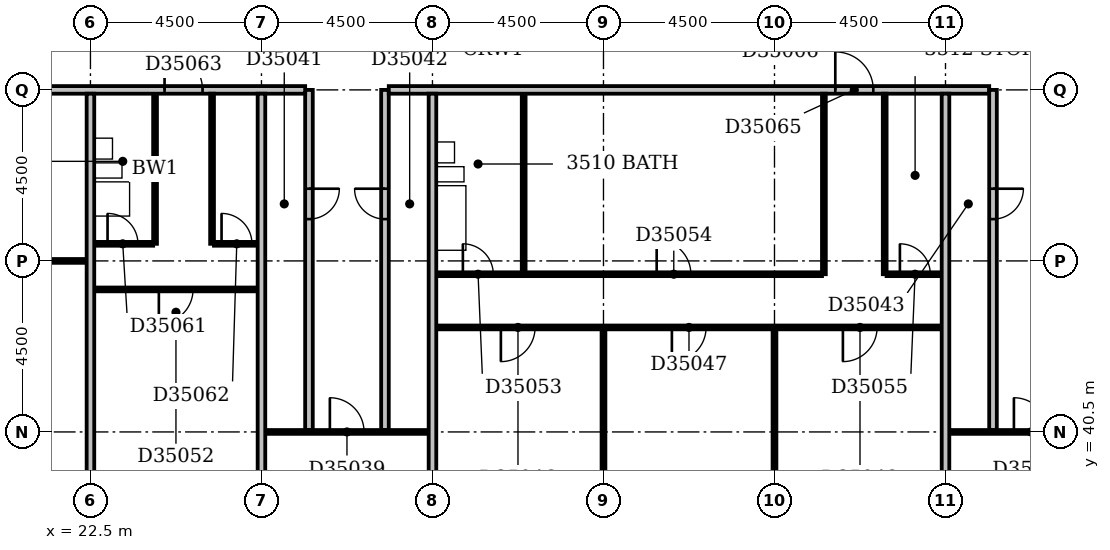
"""IFC4 building model, lengths in metres.
Left out: names, types, materials, properties, quantities, classifications, styles, units other than length and angle.
Written with IfcOpenShell. Run it as: python <this file> out.ifc"""

import sys

from ifc_helpers import new_model, si_unit, direction, frame, frame_2d, origin, place, context, subcontext, project, spatial, rectangle, extrude, element, fill, save


model = new_model("IFC4")
c1 = context("Model", 3, precision=1e-05, world=origin(), true_north=direction((0.0, 1.0)))
c2 = subcontext(c1, "Body", "Model", "MODEL_VIEW")
j1 = project(units=[si_unit("LENGTHUNIT", "METRE"), si_unit("PLANEANGLEUNIT", "RADIAN")], contexts=[c1])
p1 = place(None, origin())
s1 = spatial("IfcSite", under=j1, at=p1, CompositionType="ELEMENT")
p2 = place(p1, origin())
s2 = spatial("IfcBuilding", under=s1, at=p2, CompositionType="ELEMENT")
p3 = place(p2, frame((0.0, 0.0, 141.2)))
s3 = spatial("IfcBuildingStorey", under=s2, at=p3, CompositionType="ELEMENT", Elevation=141.2)
p4 = place(p3, frame((22.5, 36.5, 0.0), z_axis=(0.0, 0.0, 1.0), x_axis=(0.0, 1.0, 0.0)))
e1 = element("IfcWall", 1, at=p4, inside=s3, PredefinedType="PARTITIONING", context=c2, shape_type="SweptSolid", body=[
    extrude(rectangle(XDim=12.9, YDim=0.2, at=frame_2d((6.45, 0.0))), origin(), (0.0, 0.0, 1.0), 3.3),
])
p5 = place(p3, frame((27.0, 36.5, 0.0), z_axis=(0.0, 0.0, 1.0), x_axis=(0.0, 1.0, 0.0)))
e2 = element("IfcWall", 2, at=p5, inside=s3, PredefinedType="PARTITIONING", context=c2, shape_type="SweptSolid", body=[
    extrude(rectangle(XDim=12.9, YDim=0.2, at=frame_2d((6.45, 0.0))), origin(), (0.0, 0.0, 1.0), 2.6),
])
p6 = place(p3, frame((31.5, 36.5, 0.0), z_axis=(0.0, 0.0, 1.0), x_axis=(0.0, 1.0, 0.0)))
e3 = element("IfcWall", 3, at=p6, inside=s3, PredefinedType="PARTITIONING", context=c2, shape_type="SweptSolid", body=[
    extrude(rectangle(XDim=12.9, YDim=0.2, at=frame_2d((6.45, 0.0))), origin(), (0.0, 0.0, 1.0), 3.3),
])
p7 = place(p3, frame((36.0, 36.5, 0.0), z_axis=(0.0, 0.0, 1.0), x_axis=(0.0, 1.0, 0.0)))
e4 = element("IfcWall", 4, at=p7, inside=s3, PredefinedType="PARTITIONING", context=c2, shape_type="SweptSolid", body=[
    extrude(rectangle(XDim=6.7, YDim=0.1, at=frame_2d((3.35, 0.0))), origin(), (0.0, 0.0, 1.0), 2.4),
])
p8 = place(p3, frame((40.5, 36.5, 0.0), z_axis=(0.0, 0.0, 1.0), x_axis=(0.0, 1.0, 0.0)))
e5 = element("IfcWall", 5, at=p8, inside=s3, PredefinedType="PARTITIONING", context=c2, shape_type="SweptSolid", body=[
    extrude(rectangle(XDim=6.7, YDim=0.1, at=frame_2d((3.35, 0.0))), origin(), (0.0, 0.0, 1.0), 3.3),
])
p9 = place(p3, frame((45.0, 36.5, 0.0), z_axis=(0.0, 0.0, 1.0), x_axis=(0.0, 1.0, 0.0)))
e6 = element("IfcWall", 6, at=p9, inside=s3, PredefinedType="PARTITIONING", context=c2, shape_type="SweptSolid", body=[
    extrude(rectangle(XDim=12.9, YDim=0.2, at=frame_2d((6.45, 0.0))), origin(), (0.0, 0.0, 1.0), 2.6),
])
p10 = place(p3, frame((27.1, 40.5, 0.0), z_axis=(0.0, 0.0, 1.0), x_axis=(1.0, 0.0, 0.0)))
e7 = element("IfcWall", 7, at=p10, inside=s3, PredefinedType="PARTITIONING", context=c2, shape_type="SweptSolid", body=[
    extrude(rectangle(XDim=4.3, YDim=0.1, at=frame_2d((2.15, 0.0))), origin(), (0.0, 0.0, 1.0), 3.3),
])
p11 = place(p10, frame((1.7, 0.0, 0.0)))
e8 = element("IfcOpeningElement", 8, at=p11, cuts=e7, PredefinedType="OPENING", context=c2, shape_type="SweptSolid", body=[
    extrude(rectangle(XDim=0.9, YDim=2.1, at=frame_2d((0.45, 1.05))), frame((0.0, 0.062, 0.0), z_axis=(0.0, -1.0, 0.0), x_axis=(1.0, 0.0, 0.0)), (0.0, 0.0, 1.0), 0.124),
])
p12 = place(p3, frame((45.1, 40.5, 0.0), z_axis=(0.0, 0.0, 1.0), x_axis=(1.0, 0.0, 0.0)))
e9 = element("IfcWall", 9, at=p12, inside=s3, PredefinedType="PARTITIONING", context=c2, shape_type="SweptSolid", body=[
    extrude(rectangle(XDim=4.3, YDim=0.1, at=frame_2d((2.15, 0.0))), origin(), (0.0, 0.0, 1.0), 3.3),
])
p13 = place(p12, frame((1.7, 0.0, 0.0)))
e10 = element("IfcOpeningElement", 10, at=p13, cuts=e9, PredefinedType="OPENING", context=c2, shape_type="SweptSolid", body=[
    extrude(rectangle(XDim=0.9, YDim=2.1, at=frame_2d((0.45, 1.05))), frame((0.0, 0.062, 0.0), z_axis=(0.0, -1.0, 0.0), x_axis=(1.0, 0.0, 0.0)), (0.0, 0.0, 1.0), 0.124),
])
p14 = place(p3, frame((28.25, 40.55, 0.0), z_axis=(0.0, 0.0, 1.0), x_axis=(0.0, 1.0, 0.0)))
e11 = element("IfcWall", 11, at=p14, inside=s3, PredefinedType="PARTITIONING", context=c2, shape_type="SweptSolid", body=[
    extrude(rectangle(XDim=8.95, YDim=0.2, at=frame_2d((4.475, 0.0))), origin(), (0.0, 0.0, 1.0), 3.3),
])
p15 = place(p14, frame((5.55, 0.0, 0.0)))
e12 = element("IfcOpeningElement", 12, at=p15, cuts=e11, PredefinedType="OPENING", context=c2, shape_type="SweptSolid", body=[
    extrude(rectangle(XDim=0.8, YDim=2.1, at=frame_2d((0.4, 1.05))), frame((0.0, 0.112, 0.0), z_axis=(0.0, -1.0, 0.0), x_axis=(1.0, 0.0, 0.0)), (0.0, 0.0, 1.0), 0.224),
])
p16 = place(p3, frame((30.25, 40.55, 0.0), z_axis=(0.0, 0.0, 1.0), x_axis=(0.0, 1.0, 0.0)))
e13 = element("IfcWall", 13, at=p16, inside=s3, PredefinedType="PARTITIONING", context=c2, shape_type="SweptSolid", body=[
    extrude(rectangle(XDim=8.95, YDim=0.2, at=frame_2d((4.475, 0.0))), origin(), (0.0, 0.0, 1.0), 3.3),
])
p17 = place(p16, frame((5.55, 0.0, 0.0)))
e14 = element("IfcOpeningElement", 14, at=p17, cuts=e13, PredefinedType="OPENING", context=c2, shape_type="SweptSolid", body=[
    extrude(rectangle(XDim=0.8, YDim=2.1, at=frame_2d((0.4, 1.05))), frame((0.0, 0.112, 0.0), z_axis=(0.0, -1.0, 0.0), x_axis=(1.0, 0.0, 0.0)), (0.0, 0.0, 1.0), 0.224),
])
p18 = place(p3, frame((46.25, 40.55, 0.0), z_axis=(0.0, 0.0, 1.0), x_axis=(0.0, 1.0, 0.0)))
e15 = element("IfcWall", 15, at=p18, inside=s3, PredefinedType="PARTITIONING", context=c2, shape_type="SweptSolid", body=[
    extrude(rectangle(XDim=8.95, YDim=0.2, at=frame_2d((4.475, 0.0))), origin(), (0.0, 0.0, 1.0), 3.3),
])
p19 = place(p18, frame((5.55, 0.0, 0.0)))
e16 = element("IfcOpeningElement", 16, at=p19, cuts=e15, PredefinedType="OPENING", context=c2, shape_type="SweptSolid", body=[
    extrude(rectangle(XDim=0.8, YDim=2.1, at=frame_2d((0.4, 1.05))), frame((0.0, 0.112, 0.0), z_axis=(0.0, -1.0, 0.0), x_axis=(1.0, 0.0, 0.0)), (0.0, 0.0, 1.0), 0.224),
])
p20 = place(p3, frame((31.6, 43.25, 0.0), z_axis=(0.0, 0.0, 1.0), x_axis=(1.0, 0.0, 0.0)))
e17 = element("IfcWall", 17, at=p20, inside=s3, PredefinedType="PARTITIONING", context=c2, shape_type="SweptSolid", body=[
    extrude(rectangle(XDim=13.3, YDim=0.1, at=frame_2d((6.65, 0.0))), origin(), (0.0, 0.0, 1.0), 3.3),
])
p21 = place(p20, frame((1.7, 0.0, 0.0)))
e18 = element("IfcOpeningElement", 18, at=p21, cuts=e17, PredefinedType="OPENING", context=c2, shape_type="SweptSolid", body=[
    extrude(rectangle(XDim=0.9, YDim=2.1, at=frame_2d((0.45, 1.05))), frame((0.0, 0.062, 0.0), z_axis=(0.0, -1.0, 0.0), x_axis=(1.0, 0.0, 0.0)), (0.0, 0.0, 1.0), 0.124),
])
p22 = place(p20, frame((6.2, 0.0, 0.0)))
e19 = element("IfcOpeningElement", 19, at=p22, cuts=e17, PredefinedType="OPENING", context=c2, shape_type="SweptSolid", body=[
    extrude(rectangle(XDim=0.9, YDim=2.1, at=frame_2d((0.45, 1.05))), frame((0.0, 0.062, 0.0), z_axis=(0.0, -1.0, 0.0), x_axis=(1.0, 0.0, 0.0)), (0.0, 0.0, 1.0), 0.124),
])
p23 = place(p20, frame((10.7, 0.0, 0.0)))
e20 = element("IfcOpeningElement", 20, at=p23, cuts=e17, PredefinedType="OPENING", context=c2, shape_type="SweptSolid", body=[
    extrude(rectangle(XDim=0.9, YDim=2.1, at=frame_2d((0.45, 1.05))), frame((0.0, 0.062, 0.0), z_axis=(0.0, -1.0, 0.0), x_axis=(1.0, 0.0, 0.0)), (0.0, 0.0, 1.0), 0.124),
])
p24 = place(p3, frame((22.6, 44.25, 0.0), z_axis=(0.0, 0.0, 1.0), x_axis=(1.0, 0.0, 0.0)))
e21 = element("IfcWall", 21, at=p24, inside=s3, PredefinedType="PARTITIONING", context=c2, shape_type="SweptSolid", body=[
    extrude(rectangle(XDim=4.3, YDim=0.1, at=frame_2d((2.15, 0.0))), origin(), (0.0, 0.0, 1.0), 3.3),
])
p25 = place(p24, frame((1.7, 0.0, 0.0)))
e22 = element("IfcOpeningElement", 22, at=p25, cuts=e21, PredefinedType="OPENING", context=c2, shape_type="SweptSolid", body=[
    extrude(rectangle(XDim=0.9, YDim=2.1, at=frame_2d((0.45, 1.05))), frame((0.0, 0.062, 0.0), z_axis=(0.0, -1.0, 0.0), x_axis=(1.0, 0.0, 0.0)), (0.0, 0.0, 1.0), 0.124),
])
p26 = place(p3, frame((31.6, 44.65, 0.0), z_axis=(0.0, 0.0, 1.0), x_axis=(1.0, 0.0, 0.0)))
e23 = element("IfcWall", 23, at=p26, inside=s3, PredefinedType="PARTITIONING", context=c2, shape_type="SweptSolid", body=[
    extrude(rectangle(XDim=10.15, YDim=0.1, at=frame_2d((5.075, 0.0))), origin(), (0.0, 0.0, 1.0), 3.3),
])
p27 = place(p26, frame((0.7, 0.0, 0.0)))
e24 = element("IfcOpeningElement", 24, at=p27, cuts=e23, PredefinedType="OPENING", context=c2, shape_type="SweptSolid", body=[
    extrude(rectangle(XDim=0.8, YDim=2.1, at=frame_2d((0.4, 1.05))), frame((0.0, 0.062, 0.0), z_axis=(0.0, -1.0, 0.0), x_axis=(1.0, 0.0, 0.0)), (0.0, 0.0, 1.0), 0.124),
])
p28 = place(p26, frame((5.8, 0.0, 0.0)))
e25 = element("IfcOpeningElement", 25, at=p28, cuts=e23, PredefinedType="OPENING", context=c2, shape_type="SweptSolid", body=[
    extrude(rectangle(XDim=0.9, YDim=2.1, at=frame_2d((0.45, 1.05))), frame((0.0, 0.062, 0.0), z_axis=(0.0, -1.0, 0.0), x_axis=(1.0, 0.0, 0.0)), (0.0, 0.0, 1.0), 0.124),
])
for number, where, z_axis, x_axis in (
    (26, (41.8, 44.65, 0.0), (0.0, 0.0, 1.0), (0.0, 1.0, 0.0)),
    (27, (43.4, 44.65, 0.0), (0.0, 0.0, 1.0), (0.0, 1.0, 0.0)),
):
    element("IfcWall", number, at=place(p3, frame(where, z_axis=z_axis, x_axis=x_axis)), inside=s3, PredefinedType="PARTITIONING", context=c2, shape_type="SweptSolid", body=[
        extrude(rectangle(XDim=4.75, YDim=0.1, at=frame_2d((2.375, 0.0))), origin(), (0.0, 0.0, 1.0), 3.3),
    ])
p29 = place(p3, frame((43.45, 44.65, 0.0), z_axis=(0.0, 0.0, 1.0), x_axis=(1.0, 0.0, 0.0)))
e28 = element("IfcWall", 28, at=p29, inside=s3, PredefinedType="PARTITIONING", context=c2, shape_type="SweptSolid", body=[
    extrude(rectangle(XDim=1.45, YDim=0.1, at=frame_2d((0.725, 0.0))), origin(), (0.0, 0.0, 1.0), 3.3),
])
p30 = place(p29, frame((0.35, 0.0, 0.0)))
e29 = element("IfcOpeningElement", 29, at=p30, cuts=e28, PredefinedType="OPENING", context=c2, shape_type="SweptSolid", body=[
    extrude(rectangle(XDim=0.8, YDim=2.1, at=frame_2d((0.4, 1.05))), frame((0.0, 0.062, 0.0), z_axis=(0.0, -1.0, 0.0), x_axis=(1.0, 0.0, 0.0)), (0.0, 0.0, 1.0), 0.124),
])
p31 = place(p3, frame((33.9, 44.7, 0.0), z_axis=(0.0, 0.0, 1.0), x_axis=(0.0, 1.0, 0.0)))
e30 = element("IfcWall", 30, at=p31, inside=s3, PredefinedType="PLUMBINGWALL", context=c2, shape_type="SweptSolid", body=[
    extrude(rectangle(XDim=4.7, YDim=0.1, at=frame_2d((2.35, 0.0))), origin(), (0.0, 0.0, 1.0), 3.3),
])
p32 = place(p3, frame((9.1, 45.0, 0.0), z_axis=(0.0, 0.0, 1.0), x_axis=(1.0, 0.0, 0.0)))
e31 = element("IfcWall", 31, at=p32, inside=s3, PredefinedType="PARTITIONING", context=c2, shape_type="SweptSolid", body=[
    extrude(rectangle(XDim=13.3, YDim=0.1, at=frame_2d((6.65, 0.0))), origin(), (0.0, 0.0, 1.0), 3.3),
])
p33 = place(p3, frame((22.6, 45.45, 0.0), z_axis=(0.0, 0.0, 1.0), x_axis=(1.0, 0.0, 0.0)))
e32 = element("IfcWall", 32, at=p33, inside=s3, PredefinedType="PARTITIONING", context=c2, shape_type="SweptSolid", body=[
    extrude(rectangle(XDim=1.55, YDim=0.1, at=frame_2d((0.775, 0.0))), origin(), (0.0, 0.0, 1.0), 3.3),
])
p34 = place(p33, frame((0.35, 0.0, 0.0)))
e33 = element("IfcOpeningElement", 33, at=p34, cuts=e32, PredefinedType="OPENING", context=c2, shape_type="SweptSolid", body=[
    extrude(rectangle(XDim=0.8, YDim=2.1, at=frame_2d((0.4, 1.05))), frame((0.0, 0.062, 0.0), z_axis=(0.0, -1.0, 0.0), x_axis=(1.0, 0.0, 0.0)), (0.0, 0.0, 1.0), 0.124),
])
p35 = place(p3, frame((24.2, 45.45, 0.0), z_axis=(0.0, 0.0, 1.0), x_axis=(0.0, 1.0, 0.0)))
e34 = element("IfcWall", 34, at=p35, inside=s3, PredefinedType="PLUMBINGWALL", context=c2, shape_type="SweptSolid", body=[
    extrude(rectangle(XDim=3.95, YDim=0.1, at=frame_2d((1.975, 0.0))), origin(), (0.0, 0.0, 1.0), 3.3),
])
p36 = place(p3, frame((25.7, 45.45, 0.0), z_axis=(0.0, 0.0, 1.0), x_axis=(0.0, 1.0, 0.0)))
e35 = element("IfcWall", 35, at=p36, inside=s3, PredefinedType="PARTITIONING", context=c2, shape_type="SweptSolid", body=[
    extrude(rectangle(XDim=3.95, YDim=0.1, at=frame_2d((1.975, 0.0))), origin(), (0.0, 0.0, 1.0), 3.3),
])
p37 = place(p3, frame((25.75, 45.45, 0.0), z_axis=(0.0, 0.0, 1.0), x_axis=(1.0, 0.0, 0.0)))
e36 = element("IfcWall", 36, at=p37, inside=s3, PredefinedType="PARTITIONING", context=c2, shape_type="SweptSolid", body=[
    extrude(rectangle(XDim=1.15, YDim=0.1, at=frame_2d((0.575, 0.0))), origin(), (0.0, 0.0, 1.0), 3.3),
])
p38 = place(p37, frame((0.2, 0.0, 0.0)))
e37 = element("IfcOpeningElement", 37, at=p38, cuts=e36, PredefinedType="OPENING", context=c2, shape_type="SweptSolid", body=[
    extrude(rectangle(XDim=0.8, YDim=2.1, at=frame_2d((0.4, 1.05))), frame((0.0, 0.062, 0.0), z_axis=(0.0, -1.0, 0.0), x_axis=(1.0, 0.0, 0.0)), (0.0, 0.0, 1.0), 0.124),
])
p39 = place(p3, frame((9.1, 49.5, 0.0), z_axis=(0.0, 0.0, 1.0), x_axis=(1.0, 0.0, 0.0)))
e38 = element("IfcWall", 38, at=p39, inside=s3, PredefinedType="PARTITIONING", context=c2, shape_type="SweptSolid", body=[
    extrude(rectangle(XDim=19.05, YDim=0.2, at=frame_2d((9.525, 0.0))), origin(), (0.0, 0.0, 1.0), 3.3),
])
p40 = place(p39, frame((15.35, 0.0, 0.0)))
e39 = element("IfcOpeningElement", 39, at=p40, cuts=e38, PredefinedType="OPENING", context=c2, shape_type="SweptSolid", body=[
    extrude(rectangle(XDim=1.0, YDim=2.1, at=frame_2d((0.5, 1.05))), frame((0.0, 0.112, 0.0), z_axis=(0.0, -1.0, 0.0), x_axis=(1.0, 0.0, 0.0)), (0.0, 0.0, 1.0), 0.224),
])
p41 = place(p39, frame((6.15, 0.0, 0.0)))
e40 = element("IfcOpeningElement", 40, at=p41, cuts=e38, PredefinedType="OPENING", context=c2, shape_type="SweptSolid", body=[
    extrude(rectangle(XDim=0.9, YDim=2.1, at=frame_2d((0.45, 1.05))), frame((0.0, 0.112, 0.0), z_axis=(0.0, -1.0, 0.0), x_axis=(1.0, 0.0, 0.0)), (0.0, 0.0, 1.0), 0.224),
])
p42 = place(p3, frame((30.35, 49.5, 0.0), z_axis=(0.0, 0.0, 1.0), x_axis=(1.0, 0.0, 0.0)))
e41 = element("IfcWall", 41, at=p42, inside=s3, PredefinedType="PARTITIONING", context=c2, shape_type="SweptSolid", body=[
    extrude(rectangle(XDim=15.8, YDim=0.2, at=frame_2d((7.9, 0.0))), origin(), (0.0, 0.0, 1.0), 3.3),
])
p43 = place(p42, frame((11.75, 0.0, 0.0)))
e42 = element("IfcOpeningElement", 42, at=p43, cuts=e41, PredefinedType="OPENING", context=c2, shape_type="SweptSolid", body=[
    extrude(rectangle(XDim=1.0, YDim=2.1, at=frame_2d((0.5, 1.05))), frame((0.0, 0.112, 0.0), z_axis=(0.0, -1.0, 0.0), x_axis=(1.0, 0.0, 0.0)), (0.0, 0.0, 1.0), 0.224),
])
p44 = place(p11, origin())
e43 = element("IfcDoor", 43, at=p44, inside=s3, OperationType="SINGLE_SWING_LEFT", PredefinedType="DOOR", context=c2, shape_type="SweptSolid", body=[
    extrude(rectangle(XDim=0.9, YDim=2.1, at=frame_2d((0.45, 1.05))), frame((0.0, 0.025, 0.0), z_axis=(0.0, -1.0, 0.0), x_axis=(1.0, 0.0, 0.0)), (0.0, 0.0, 1.0), 0.05),
])
fill(e8, e43)
p45 = place(p13, origin())
e44 = element("IfcDoor", 44, at=p45, inside=s3, OperationType="SINGLE_SWING_LEFT", PredefinedType="DOOR", context=c2, shape_type="SweptSolid", body=[
    extrude(rectangle(XDim=0.9, YDim=2.1, at=frame_2d((0.45, 1.05))), frame((0.0, 0.025, 0.0), z_axis=(0.0, -1.0, 0.0), x_axis=(1.0, 0.0, 0.0)), (0.0, 0.0, 1.0), 0.05),
])
fill(e10, e44)
p46 = place(p15, origin())
e45 = element("IfcDoor", 45, at=p46, inside=s3, OperationType="SINGLE_SWING_RIGHT", PredefinedType="DOOR", context=c2, shape_type="SweptSolid", body=[
    extrude(rectangle(XDim=0.8, YDim=2.1, at=frame_2d((0.4, 1.05))), frame((0.0, 0.025, 0.0), z_axis=(0.0, -1.0, 0.0), x_axis=(1.0, 0.0, 0.0)), (0.0, 0.0, 1.0), 0.05),
])
fill(e12, e45)
p47 = place(p17, frame((0.8, 0.0, 0.0), z_axis=(0.0, 0.0, 1.0), x_axis=(-1.0, 0.0, 0.0)))
e46 = element("IfcDoor", 46, at=p47, inside=s3, OperationType="SINGLE_SWING_LEFT", PredefinedType="DOOR", context=c2, shape_type="SweptSolid", body=[
    extrude(rectangle(XDim=0.8, YDim=2.1, at=frame_2d((0.4, 1.05))), frame((0.0, 0.025, 0.0), z_axis=(0.0, -1.0, 0.0), x_axis=(1.0, 0.0, 0.0)), (0.0, 0.0, 1.0), 0.05),
])
fill(e14, e46)
p48 = place(p19, origin())
e47 = element("IfcDoor", 47, at=p48, inside=s3, OperationType="SINGLE_SWING_RIGHT", PredefinedType="DOOR", context=c2, shape_type="SweptSolid", body=[
    extrude(rectangle(XDim=0.8, YDim=2.1, at=frame_2d((0.4, 1.05))), frame((0.0, 0.025, 0.0), z_axis=(0.0, -1.0, 0.0), x_axis=(1.0, 0.0, 0.0)), (0.0, 0.0, 1.0), 0.05),
])
fill(e16, e47)
p49 = place(p21, frame((0.9, 0.0, 0.0), z_axis=(0.0, 0.0, 1.0), x_axis=(-1.0, 0.0, 0.0)))
e48 = element("IfcDoor", 48, at=p49, inside=s3, OperationType="SINGLE_SWING_RIGHT", PredefinedType="DOOR", context=c2, shape_type="SweptSolid", body=[
    extrude(rectangle(XDim=0.9, YDim=2.1, at=frame_2d((0.45, 1.05))), frame((0.0, 0.025, 0.0), z_axis=(0.0, -1.0, 0.0), x_axis=(1.0, 0.0, 0.0)), (0.0, 0.0, 1.0), 0.05),
])
fill(e18, e48)
p50 = place(p22, frame((0.9, 0.0, 0.0), z_axis=(0.0, 0.0, 1.0), x_axis=(-1.0, 0.0, 0.0)))
e49 = element("IfcDoor", 49, at=p50, inside=s3, OperationType="SINGLE_SWING_RIGHT", PredefinedType="DOOR", context=c2, shape_type="SweptSolid", body=[
    extrude(rectangle(XDim=0.9, YDim=2.1, at=frame_2d((0.45, 1.05))), frame((0.0, 0.025, 0.0), z_axis=(0.0, -1.0, 0.0), x_axis=(1.0, 0.0, 0.0)), (0.0, 0.0, 1.0), 0.05),
])
fill(e19, e49)
p51 = place(p23, frame((0.9, 0.0, 0.0), z_axis=(0.0, 0.0, 1.0), x_axis=(-1.0, 0.0, 0.0)))
e50 = element("IfcDoor", 50, at=p51, inside=s3, OperationType="SINGLE_SWING_RIGHT", PredefinedType="DOOR", context=c2, shape_type="SweptSolid", body=[
    extrude(rectangle(XDim=0.9, YDim=2.1, at=frame_2d((0.45, 1.05))), frame((0.0, 0.025, 0.0), z_axis=(0.0, -1.0, 0.0), x_axis=(1.0, 0.0, 0.0)), (0.0, 0.0, 1.0), 0.05),
])
fill(e20, e50)
p52 = place(p25, frame((0.9, 0.0, 0.0), z_axis=(0.0, 0.0, 1.0), x_axis=(-1.0, 0.0, 0.0)))
e51 = element("IfcDoor", 51, at=p52, inside=s3, OperationType="SINGLE_SWING_RIGHT", PredefinedType="DOOR", context=c2, shape_type="SweptSolid", body=[
    extrude(rectangle(XDim=0.9, YDim=2.1, at=frame_2d((0.45, 1.05))), frame((0.0, 0.025, 0.0), z_axis=(0.0, -1.0, 0.0), x_axis=(1.0, 0.0, 0.0)), (0.0, 0.0, 1.0), 0.05),
])
fill(e22, e51)
p53 = place(p27, origin())
e52 = element("IfcDoor", 52, at=p53, inside=s3, OperationType="SINGLE_SWING_LEFT", PredefinedType="DOOR", context=c2, shape_type="SweptSolid", body=[
    extrude(rectangle(XDim=0.8, YDim=2.1, at=frame_2d((0.4, 1.05))), frame((0.0, 0.025, 0.0), z_axis=(0.0, -1.0, 0.0), x_axis=(1.0, 0.0, 0.0)), (0.0, 0.0, 1.0), 0.05),
])
fill(e24, e52)
p54 = place(p28, origin())
e53 = element("IfcDoor", 53, at=p54, inside=s3, OperationType="SINGLE_SWING_LEFT", PredefinedType="DOOR", context=c2, shape_type="SweptSolid", body=[
    extrude(rectangle(XDim=0.9, YDim=2.1, at=frame_2d((0.45, 1.05))), frame((0.0, 0.025, 0.0), z_axis=(0.0, -1.0, 0.0), x_axis=(1.0, 0.0, 0.0)), (0.0, 0.0, 1.0), 0.05),
])
fill(e25, e53)
p55 = place(p30, origin())
e54 = element("IfcDoor", 54, at=p55, inside=s3, OperationType="SINGLE_SWING_LEFT", PredefinedType="DOOR", context=c2, shape_type="SweptSolid", body=[
    extrude(rectangle(XDim=0.8, YDim=2.1, at=frame_2d((0.4, 1.05))), frame((0.0, 0.025, 0.0), z_axis=(0.0, -1.0, 0.0), x_axis=(1.0, 0.0, 0.0)), (0.0, 0.0, 1.0), 0.05),
])
fill(e29, e54)
p56 = place(p34, origin())
e55 = element("IfcDoor", 55, at=p56, inside=s3, OperationType="SINGLE_SWING_LEFT", PredefinedType="DOOR", context=c2, shape_type="SweptSolid", body=[
    extrude(rectangle(XDim=0.8, YDim=2.1, at=frame_2d((0.4, 1.05))), frame((0.0, 0.025, 0.0), z_axis=(0.0, -1.0, 0.0), x_axis=(1.0, 0.0, 0.0)), (0.0, 0.0, 1.0), 0.05),
])
fill(e33, e55)
p57 = place(p38, origin())
e56 = element("IfcDoor", 56, at=p57, inside=s3, OperationType="SINGLE_SWING_LEFT", PredefinedType="DOOR", context=c2, shape_type="SweptSolid", body=[
    extrude(rectangle(XDim=0.8, YDim=2.1, at=frame_2d((0.4, 1.05))), frame((0.0, 0.025, 0.0), z_axis=(0.0, -1.0, 0.0), x_axis=(1.0, 0.0, 0.0)), (0.0, 0.0, 1.0), 0.05),
])
fill(e37, e56)
p58 = place(p40, origin())
e57 = element("IfcDoor", 57, at=p58, inside=s3, OperationType="SINGLE_SWING_LEFT", PredefinedType="DOOR", context=c2, shape_type="SweptSolid", body=[
    extrude(rectangle(XDim=1.0, YDim=2.1, at=frame_2d((0.5, 1.05))), frame((0.0, 0.025, 0.0), z_axis=(0.0, -1.0, 0.0), x_axis=(1.0, 0.0, 0.0)), (0.0, 0.0, 1.0), 0.05),
])
fill(e39, e57)
p59 = place(p43, origin())
e58 = element("IfcDoor", 58, at=p59, inside=s3, OperationType="SINGLE_SWING_LEFT", PredefinedType="DOOR", context=c2, shape_type="SweptSolid", body=[
    extrude(rectangle(XDim=1.0, YDim=2.1, at=frame_2d((0.5, 1.05))), frame((0.0, 0.025, 0.0), z_axis=(0.0, -1.0, 0.0), x_axis=(1.0, 0.0, 0.0)), (0.0, 0.0, 1.0), 0.05),
])
fill(e42, e58)
save(model, sys.argv[1])
